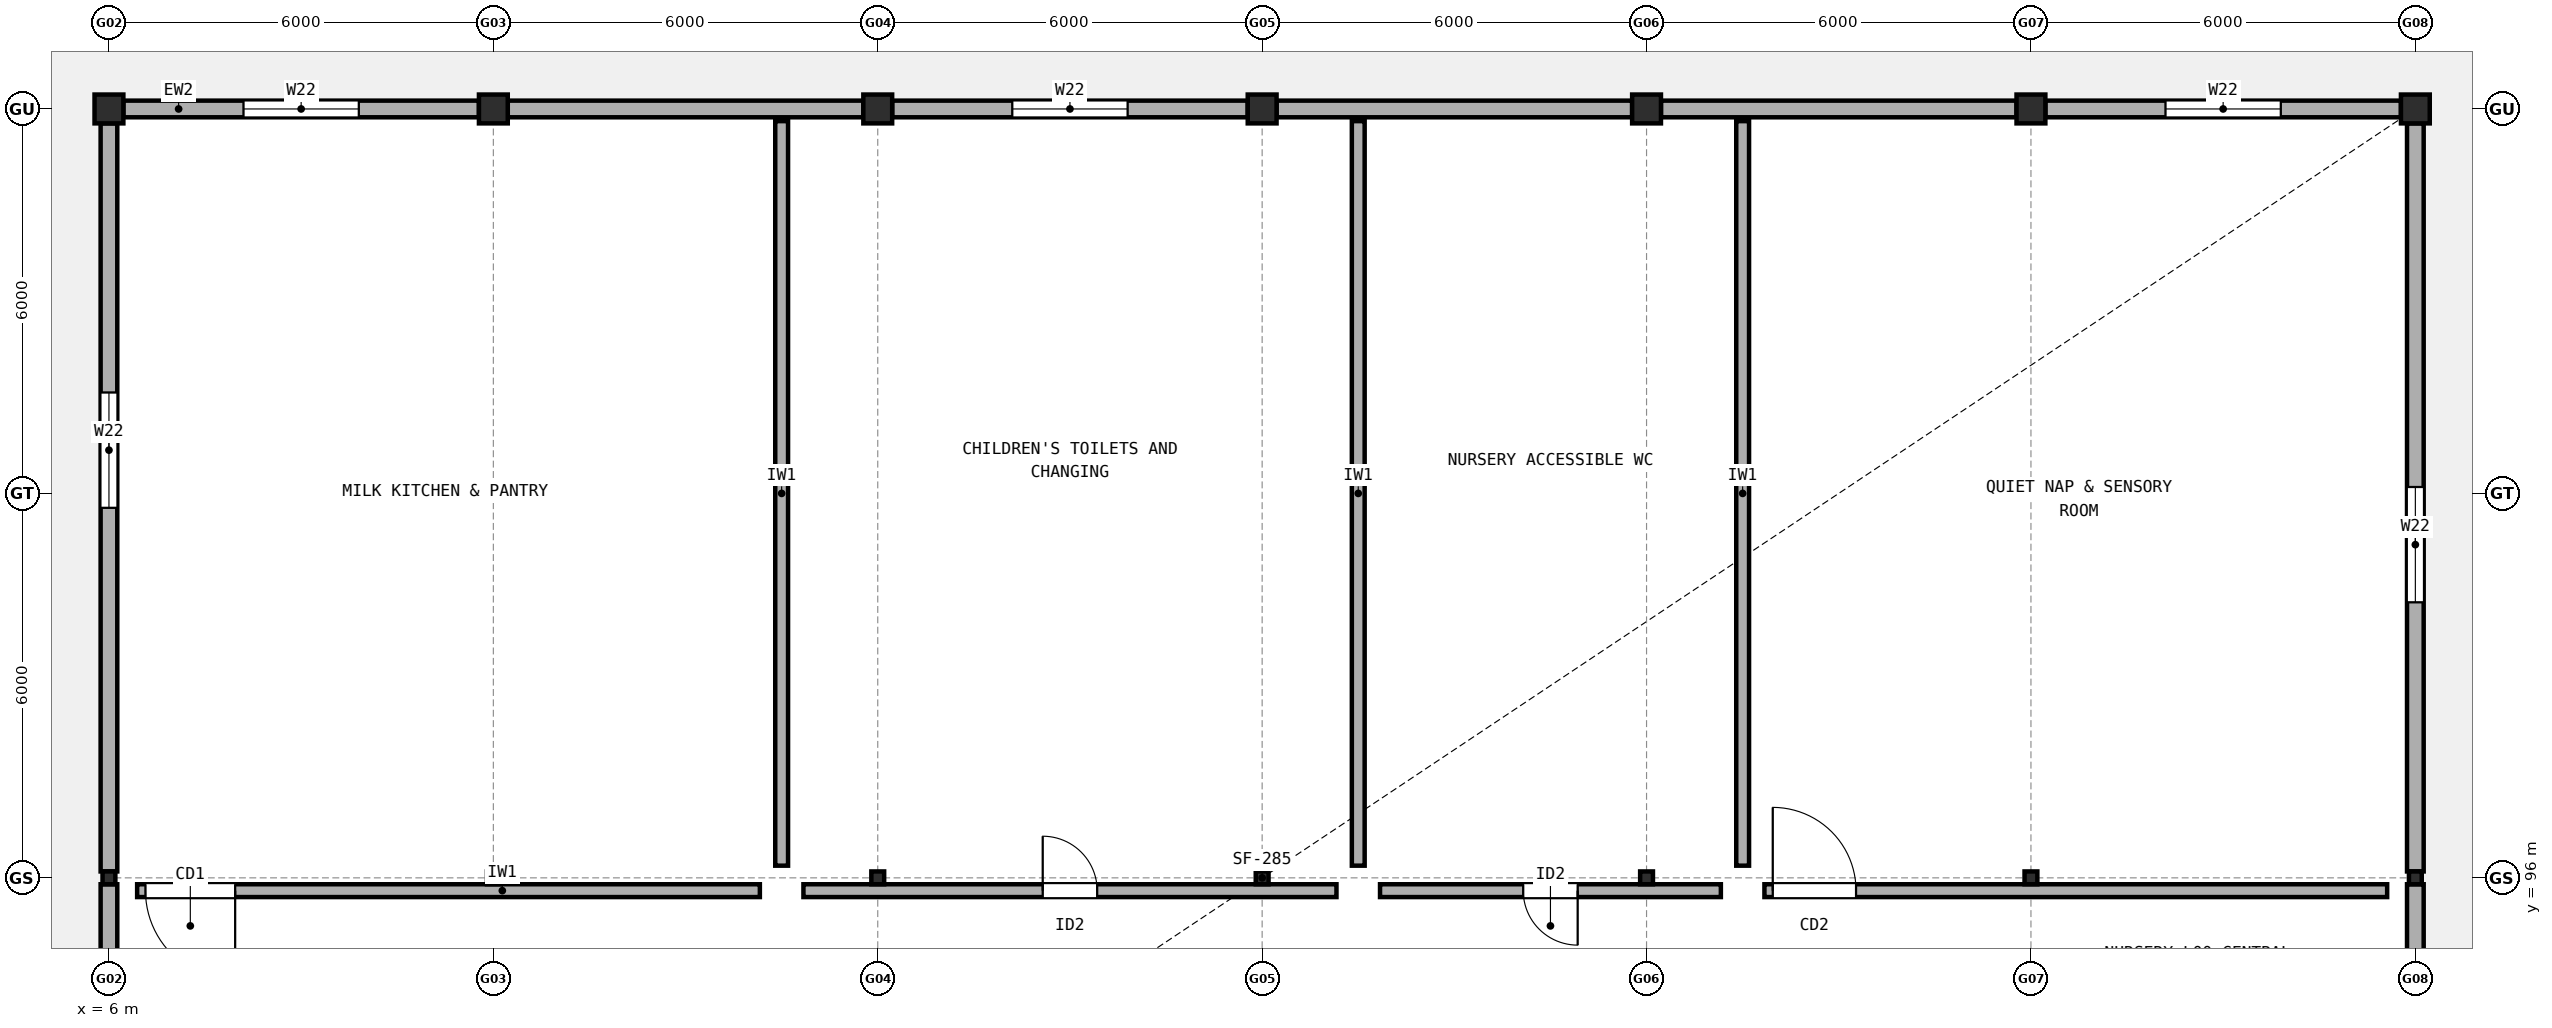
"""IFC4 building model, lengths in metres.
Left out: names, types, materials, properties, quantities, classifications, styles, units other than length and angle.
Written with IfcOpenShell. Run it as: python <this file> out.ifc"""

import sys

from ifc_helpers import new_model, si_unit, direction, frame, frame_2d, origin, origin_2d, place, context, subcontext, project, spatial, rectangle, i_section, extrude, element, fill, save


model = new_model("IFC4")
c1 = context("Model", 3, precision=1e-05, world=origin(), true_north=direction((0.0, 1.0)))
c2 = subcontext(c1, "Body", "Model", "MODEL_VIEW")
j1 = project(units=[si_unit("LENGTHUNIT", "METRE"), si_unit("PLANEANGLEUNIT", "RADIAN")], contexts=[c1])
p1 = place(None, origin())
s1 = spatial("IfcSite", under=j1, at=p1, CompositionType="ELEMENT")
p2 = place(p1, origin())
s2 = spatial("IfcBuilding", under=s1, at=p2, CompositionType="ELEMENT")
p3 = place(p2, origin())
s3 = spatial("IfcBuildingStorey", under=s2, at=p3, CompositionType="ELEMENT", Elevation=0.0)
p4 = place(p3, frame((6.0, 96.0, 0.0), z_axis=(0.0, 0.0, 1.0), x_axis=(1.0, 0.0, 0.0)))
e1 = element("IfcColumn", 1, at=p4, inside=s3, PredefinedType="COLUMN", context=c2, shape_type="SweptSolid", body=[
    extrude(i_section(OverallWidth=0.2, OverallDepth=0.2, WebThickness=0.009, FlangeThickness=0.015, FilletRadius=0.018, at=origin_2d()), origin(), (0.0, 0.0, 1.0), 4.23),
])
p5 = place(p3, frame((6.0, 108.0, 0.0), z_axis=(0.0, 0.0, 1.0), x_axis=(1.0, 0.0, 0.0)))
e2 = element("IfcColumn", 2, at=p5, inside=s3, PredefinedType="COLUMN", context=c2, shape_type="SweptSolid", body=[
    extrude(rectangle(XDim=0.45, YDim=0.45, at=origin_2d()), origin(), (0.0, 0.0, 1.0), 4.23),
])
p6 = place(p3, frame((12.0, 96.0, 0.0), z_axis=(0.0, 0.0, 1.0), x_axis=(1.0, 0.0, 0.0)))
e3 = element("IfcColumn", 3, at=p6, inside=s3, PredefinedType="COLUMN", context=c2, shape_type="SweptSolid", body=[
    extrude(i_section(OverallWidth=0.2, OverallDepth=0.2, WebThickness=0.009, FlangeThickness=0.015, FilletRadius=0.018, at=origin_2d()), origin(), (0.0, 0.0, 1.0), 4.23),
])
p7 = place(p3, frame((12.0, 108.0, 0.0), z_axis=(0.0, 0.0, 1.0), x_axis=(1.0, 0.0, 0.0)))
e4 = element("IfcColumn", 4, at=p7, inside=s3, PredefinedType="COLUMN", context=c2, shape_type="SweptSolid", body=[
    extrude(rectangle(XDim=0.45, YDim=0.45, at=origin_2d()), origin(), (0.0, 0.0, 1.0), 4.23),
])
p8 = place(p3, frame((18.0, 96.0, 0.0), z_axis=(0.0, 0.0, 1.0), x_axis=(1.0, 0.0, 0.0)))
e5 = element("IfcColumn", 5, at=p8, inside=s3, PredefinedType="COLUMN", context=c2, shape_type="SweptSolid", body=[
    extrude(i_section(OverallWidth=0.2, OverallDepth=0.2, WebThickness=0.009, FlangeThickness=0.015, FilletRadius=0.018, at=origin_2d()), origin(), (0.0, 0.0, 1.0), 4.23),
])
p9 = place(p3, frame((18.0, 108.0, 0.0), z_axis=(0.0, 0.0, 1.0), x_axis=(1.0, 0.0, 0.0)))
e6 = element("IfcColumn", 6, at=p9, inside=s3, PredefinedType="COLUMN", context=c2, shape_type="SweptSolid", body=[
    extrude(rectangle(XDim=0.45, YDim=0.45, at=origin_2d()), origin(), (0.0, 0.0, 1.0), 4.23),
])
p10 = place(p3, frame((24.0, 96.0, 0.0), z_axis=(0.0, 0.0, 1.0), x_axis=(1.0, 0.0, 0.0)))
e7 = element("IfcColumn", 7, at=p10, inside=s3, PredefinedType="COLUMN", context=c2, shape_type="SweptSolid", body=[
    extrude(i_section(OverallWidth=0.2, OverallDepth=0.2, WebThickness=0.009, FlangeThickness=0.015, FilletRadius=0.018, at=origin_2d()), origin(), (0.0, 0.0, 1.0), 4.23),
])
p11 = place(p3, frame((24.0, 108.0, 0.0), z_axis=(0.0, 0.0, 1.0), x_axis=(1.0, 0.0, 0.0)))
e8 = element("IfcColumn", 8, at=p11, inside=s3, PredefinedType="COLUMN", context=c2, shape_type="SweptSolid", body=[
    extrude(rectangle(XDim=0.45, YDim=0.45, at=origin_2d()), origin(), (0.0, 0.0, 1.0), 4.23),
])
p12 = place(p3, frame((30.0, 96.0, 0.0), z_axis=(0.0, 0.0, 1.0), x_axis=(1.0, 0.0, 0.0)))
e9 = element("IfcColumn", 9, at=p12, inside=s3, PredefinedType="COLUMN", context=c2, shape_type="SweptSolid", body=[
    extrude(i_section(OverallWidth=0.2, OverallDepth=0.2, WebThickness=0.009, FlangeThickness=0.015, FilletRadius=0.018, at=origin_2d()), origin(), (0.0, 0.0, 1.0), 4.23),
])
p13 = place(p3, frame((30.0, 108.0, 0.0), z_axis=(0.0, 0.0, 1.0), x_axis=(1.0, 0.0, 0.0)))
e10 = element("IfcColumn", 10, at=p13, inside=s3, PredefinedType="COLUMN", context=c2, shape_type="SweptSolid", body=[
    extrude(rectangle(XDim=0.45, YDim=0.45, at=origin_2d()), origin(), (0.0, 0.0, 1.0), 4.23),
])
p14 = place(p3, frame((36.0, 96.0, 0.0), z_axis=(0.0, 0.0, 1.0), x_axis=(1.0, 0.0, 0.0)))
e11 = element("IfcColumn", 11, at=p14, inside=s3, PredefinedType="COLUMN", context=c2, shape_type="SweptSolid", body=[
    extrude(i_section(OverallWidth=0.2, OverallDepth=0.2, WebThickness=0.009, FlangeThickness=0.015, FilletRadius=0.018, at=origin_2d()), origin(), (0.0, 0.0, 1.0), 4.23),
])
p15 = place(p3, frame((36.0, 108.0, 0.0), z_axis=(0.0, 0.0, 1.0), x_axis=(1.0, 0.0, 0.0)))
e12 = element("IfcColumn", 12, at=p15, inside=s3, PredefinedType="COLUMN", context=c2, shape_type="SweptSolid", body=[
    extrude(rectangle(XDim=0.45, YDim=0.45, at=origin_2d()), origin(), (0.0, 0.0, 1.0), 4.23),
])
p16 = place(p3, frame((42.0, 96.0, 0.0), z_axis=(0.0, 0.0, 1.0), x_axis=(1.0, 0.0, 0.0)))
e13 = element("IfcColumn", 13, at=p16, inside=s3, PredefinedType="COLUMN", context=c2, shape_type="SweptSolid", body=[
    extrude(i_section(OverallWidth=0.2, OverallDepth=0.2, WebThickness=0.009, FlangeThickness=0.015, FilletRadius=0.018, at=origin_2d()), origin(), (0.0, 0.0, 1.0), 4.23),
])
p17 = place(p3, frame((42.0, 108.0, 0.0), z_axis=(0.0, 0.0, 1.0), x_axis=(1.0, 0.0, 0.0)))
e14 = element("IfcColumn", 14, at=p17, inside=s3, PredefinedType="COLUMN", context=c2, shape_type="SweptSolid", body=[
    extrude(rectangle(XDim=0.45, YDim=0.45, at=origin_2d()), origin(), (0.0, 0.0, 1.0), 4.23),
])
p18 = place(p3, frame((11.775, 108.0, 0.0), z_axis=(0.0, 0.0, 1.0), x_axis=(-1.0, 0.0, 0.0)))
e15 = element("IfcWall", 15, at=p18, inside=s3, PredefinedType="STANDARD", context=c2, shape_type="SweptSolid", body=[
    extrude(rectangle(XDim=5.55, YDim=0.26, at=frame_2d((2.775, 0.0))), origin(), (0.0, 0.0, 1.0), 3.112),
])
p19 = place(p18, frame((1.875, 0.0, 0.85)))
e16 = element("IfcOpeningElement", 16, at=p19, cuts=e15, PredefinedType="OPENING", context=c2, shape_type="SweptSolid", body=[
    extrude(rectangle(XDim=1.8, YDim=1.45, at=frame_2d((0.9, 0.725))), frame((0.0, 0.14, 0.0), z_axis=(0.0, -1.0, 0.0), x_axis=(1.0, 0.0, 0.0)), (0.0, 0.0, 1.0), 0.28),
])
p20 = place(p3, frame((17.775, 108.0, 0.0), z_axis=(0.0, 0.0, 1.0), x_axis=(-1.0, 0.0, 0.0)))
e17 = element("IfcWall", 17, at=p20, inside=s3, PredefinedType="STANDARD", context=c2, shape_type="SweptSolid", body=[
    extrude(rectangle(XDim=5.55, YDim=0.26, at=frame_2d((2.775, 0.0))), origin(), (0.0, 0.0, 1.0), 3.112),
])
p21 = place(p3, frame((23.775, 108.0, 0.0), z_axis=(0.0, 0.0, 1.0), x_axis=(-1.0, 0.0, 0.0)))
e18 = element("IfcWall", 18, at=p21, inside=s3, PredefinedType="STANDARD", context=c2, shape_type="SweptSolid", body=[
    extrude(rectangle(XDim=5.55, YDim=0.26, at=frame_2d((2.775, 0.0))), origin(), (0.0, 0.0, 1.0), 3.112),
])
p22 = place(p21, frame((1.875, 0.0, 0.85)))
e19 = element("IfcOpeningElement", 19, at=p22, cuts=e18, PredefinedType="OPENING", context=c2, shape_type="SweptSolid", body=[
    extrude(rectangle(XDim=1.8, YDim=1.45, at=frame_2d((0.9, 0.725))), frame((0.0, 0.14, 0.0), z_axis=(0.0, -1.0, 0.0), x_axis=(1.0, 0.0, 0.0)), (0.0, 0.0, 1.0), 0.28),
])
for number, where, z_axis, x_axis in (
    (20, (29.775, 108.0, 0.0), (0.0, 0.0, 1.0), (-1.0, 0.0, 0.0)),
    (21, (35.775, 108.0, 0.0), (0.0, 0.0, 1.0), (-1.0, 0.0, 0.0)),
):
    element("IfcWall", number, at=place(p3, frame(where, z_axis=z_axis, x_axis=x_axis)), inside=s3, PredefinedType="STANDARD", context=c2, shape_type="SweptSolid", body=[
        extrude(rectangle(XDim=5.55, YDim=0.26, at=frame_2d((2.775, 0.0))), origin(), (0.0, 0.0, 1.0), 3.112),
    ])
p23 = place(p3, frame((41.775, 108.0, 0.0), z_axis=(0.0, 0.0, 1.0), x_axis=(-1.0, 0.0, 0.0)))
e22 = element("IfcWall", 22, at=p23, inside=s3, PredefinedType="STANDARD", context=c2, shape_type="SweptSolid", body=[
    extrude(rectangle(XDim=5.55, YDim=0.26, at=frame_2d((2.775, 0.0))), origin(), (0.0, 0.0, 1.0), 3.112),
])
p24 = place(p23, frame((1.875, 0.0, 0.85)))
e23 = element("IfcOpeningElement", 23, at=p24, cuts=e22, PredefinedType="OPENING", context=c2, shape_type="SweptSolid", body=[
    extrude(rectangle(XDim=1.8, YDim=1.45, at=frame_2d((0.9, 0.725))), frame((0.0, 0.14, 0.0), z_axis=(0.0, -1.0, 0.0), x_axis=(1.0, 0.0, 0.0)), (0.0, 0.0, 1.0), 0.28),
])
p25 = place(p3, frame((6.0, 95.9, 0.0), z_axis=(0.0, 0.0, 1.0), x_axis=(0.0, -1.0, 0.0)))
e24 = element("IfcWall", 24, at=p25, inside=s3, PredefinedType="STANDARD", context=c2, shape_type="SweptSolid", body=[
    extrude(rectangle(XDim=11.675, YDim=0.26, at=frame_2d((5.837, 0.0))), origin(), (0.0, 0.0, 1.0), 2.912),
])
p26 = place(p25, frame((4.2, 0.0, 0.85)))
e25 = element("IfcOpeningElement", 25, at=p26, cuts=e24, PredefinedType="OPENING", context=c2, shape_type="SweptSolid", body=[
    extrude(rectangle(XDim=1.8, YDim=1.45, at=frame_2d((0.9, 0.725))), frame((0.0, 0.14, 0.0), z_axis=(0.0, -1.0, 0.0), x_axis=(1.0, 0.0, 0.0)), (0.0, 0.0, 1.0), 0.28),
])
p27 = place(p3, frame((42.0, 84.225, 0.0), z_axis=(0.0, 0.0, 1.0), x_axis=(0.0, 1.0, 0.0)))
e26 = element("IfcWall", 26, at=p27, inside=s3, PredefinedType="STANDARD", context=c2, shape_type="SweptSolid", body=[
    extrude(rectangle(XDim=11.675, YDim=0.26, at=frame_2d((5.837, 0.0))), origin(), (0.0, 0.0, 1.0), 2.912),
])
p28 = place(p27, frame((4.2, 0.0, 0.85)))
e27 = element("IfcOpeningElement", 27, at=p28, cuts=e26, PredefinedType="OPENING", context=c2, shape_type="SweptSolid", body=[
    extrude(rectangle(XDim=1.8, YDim=1.45, at=frame_2d((0.9, 0.725))), frame((0.0, 0.14, 0.0), z_axis=(0.0, -1.0, 0.0), x_axis=(1.0, 0.0, 0.0)), (0.0, 0.0, 1.0), 0.28),
])
p29 = place(p3, frame((6.0, 107.775, 0.0), z_axis=(0.0, 0.0, 1.0), x_axis=(0.0, -1.0, 0.0)))
e28 = element("IfcWall", 28, at=p29, inside=s3, PredefinedType="STANDARD", context=c2, shape_type="SweptSolid", body=[
    extrude(rectangle(XDim=11.675, YDim=0.26, at=frame_2d((5.837, 0.0))), origin(), (0.0, 0.0, 1.0), 2.912),
])
p30 = place(p29, frame((4.2, 0.0, 0.85)))
e29 = element("IfcOpeningElement", 29, at=p30, cuts=e28, PredefinedType="OPENING", context=c2, shape_type="SweptSolid", body=[
    extrude(rectangle(XDim=1.8, YDim=1.45, at=frame_2d((0.9, 0.725))), frame((0.0, 0.14, 0.0), z_axis=(0.0, -1.0, 0.0), x_axis=(1.0, 0.0, 0.0)), (0.0, 0.0, 1.0), 0.28),
])
p31 = place(p3, frame((42.0, 96.1, 0.0), z_axis=(0.0, 0.0, 1.0), x_axis=(0.0, 1.0, 0.0)))
e30 = element("IfcWall", 30, at=p31, inside=s3, PredefinedType="STANDARD", context=c2, shape_type="SweptSolid", body=[
    extrude(rectangle(XDim=11.675, YDim=0.26, at=frame_2d((5.837, 0.0))), origin(), (0.0, 0.0, 1.0), 2.912),
])
p32 = place(p31, frame((4.2, 0.0, 0.85)))
e31 = element("IfcOpeningElement", 31, at=p32, cuts=e30, PredefinedType="OPENING", context=c2, shape_type="SweptSolid", body=[
    extrude(rectangle(XDim=1.8, YDim=1.45, at=frame_2d((0.9, 0.725))), frame((0.0, 0.14, 0.0), z_axis=(0.0, -1.0, 0.0), x_axis=(1.0, 0.0, 0.0)), (0.0, 0.0, 1.0), 0.28),
])
p33 = place(p3, frame((6.44, 95.8, 0.0), z_axis=(0.0, 0.0, 1.0), x_axis=(1.0, 0.0, 0.0)))
e32 = element("IfcWall", 32, at=p33, inside=s3, PredefinedType="SOLIDWALL", context=c2, shape_type="SweptSolid", body=[
    extrude(rectangle(XDim=9.72, YDim=0.2, at=frame_2d((4.86, 0.0))), origin(), (0.0, 0.0, 1.0), 3.562),
])
p34 = place(p33, frame((0.13, 0.0, 0.0)))
e33 = element("IfcOpeningElement", 33, at=p34, cuts=e32, PredefinedType="OPENING", context=c2, shape_type="SweptSolid", body=[
    extrude(rectangle(XDim=1.4, YDim=2.15, at=frame_2d((0.7, 1.075))), frame((0.0, 0.11, 0.0), z_axis=(0.0, -1.0, 0.0), x_axis=(1.0, 0.0, 0.0)), (0.0, 0.0, 1.0), 0.22),
])
p35 = place(p3, frame((16.5, 96.19, 0.0), z_axis=(0.0, 0.0, 1.0), x_axis=(0.0, 1.0, 0.0)))
e34 = element("IfcWall", 34, at=p35, inside=s3, PredefinedType="SOLIDWALL", context=c2, shape_type="SweptSolid", body=[
    extrude(rectangle(XDim=11.62, YDim=0.2, at=frame_2d((5.81, 0.0))), origin(), (0.0, 0.0, 1.0), 3.112),
])
p36 = place(p3, frame((16.84, 95.8, 0.0), z_axis=(0.0, 0.0, 1.0), x_axis=(1.0, 0.0, 0.0)))
e35 = element("IfcWall", 35, at=p36, inside=s3, PredefinedType="SOLIDWALL", context=c2, shape_type="SweptSolid", body=[
    extrude(rectangle(XDim=8.32, YDim=0.2, at=frame_2d((4.16, 0.0))), origin(), (0.0, 0.0, 1.0), 2.912),
])
p37 = place(p36, frame((3.735, 0.0, 0.0)))
e36 = element("IfcOpeningElement", 36, at=p37, cuts=e35, PredefinedType="OPENING", context=c2, shape_type="SweptSolid", body=[
    extrude(rectangle(XDim=0.85, YDim=2.1, at=frame_2d((0.425, 1.05))), frame((0.0, 0.11, 0.0), z_axis=(0.0, -1.0, 0.0), x_axis=(1.0, 0.0, 0.0)), (0.0, 0.0, 1.0), 0.22),
])
p38 = place(p3, frame((25.5, 96.19, 0.0), z_axis=(0.0, 0.0, 1.0), x_axis=(0.0, 1.0, 0.0)))
e37 = element("IfcWall", 37, at=p38, inside=s3, PredefinedType="SOLIDWALL", context=c2, shape_type="SweptSolid", body=[
    extrude(rectangle(XDim=11.62, YDim=0.2, at=frame_2d((5.81, 0.0))), origin(), (0.0, 0.0, 1.0), 3.112),
])
p39 = place(p3, frame((25.84, 95.8, 0.0), z_axis=(0.0, 0.0, 1.0), x_axis=(1.0, 0.0, 0.0)))
e38 = element("IfcWall", 38, at=p39, inside=s3, PredefinedType="SOLIDWALL", context=c2, shape_type="SweptSolid", body=[
    extrude(rectangle(XDim=5.32, YDim=0.2, at=frame_2d((2.66, 0.0))), origin(), (0.0, 0.0, 1.0), 2.912),
])
p40 = place(p39, frame((2.235, 0.0, 0.0)))
e39 = element("IfcOpeningElement", 39, at=p40, cuts=e38, PredefinedType="OPENING", context=c2, shape_type="SweptSolid", body=[
    extrude(rectangle(XDim=0.85, YDim=2.1, at=frame_2d((0.425, 1.05))), frame((0.0, 0.11, 0.0), z_axis=(0.0, -1.0, 0.0), x_axis=(1.0, 0.0, 0.0)), (0.0, 0.0, 1.0), 0.22),
])
p41 = place(p3, frame((31.5, 96.19, 0.0), z_axis=(0.0, 0.0, 1.0), x_axis=(0.0, 1.0, 0.0)))
e40 = element("IfcWall", 40, at=p41, inside=s3, PredefinedType="SOLIDWALL", context=c2, shape_type="SweptSolid", body=[
    extrude(rectangle(XDim=11.62, YDim=0.2, at=frame_2d((5.81, 0.0))), origin(), (0.0, 0.0, 1.0), 3.112),
])
p42 = place(p3, frame((31.84, 95.8, 0.0), z_axis=(0.0, 0.0, 1.0), x_axis=(1.0, 0.0, 0.0)))
e41 = element("IfcWall", 41, at=p42, inside=s3, PredefinedType="SOLIDWALL", context=c2, shape_type="SweptSolid", body=[
    extrude(rectangle(XDim=9.72, YDim=0.2, at=frame_2d((4.86, 0.0))), origin(), (0.0, 0.0, 1.0), 2.912),
])
p43 = place(p42, frame((0.13, 0.0, 0.0)))
e42 = element("IfcOpeningElement", 42, at=p43, cuts=e41, PredefinedType="OPENING", context=c2, shape_type="SweptSolid", body=[
    extrude(rectangle(XDim=1.3, YDim=2.15, at=frame_2d((0.65, 1.075))), frame((0.0, 0.11, 0.0), z_axis=(0.0, -1.0, 0.0), x_axis=(1.0, 0.0, 0.0)), (0.0, 0.0, 1.0), 0.22),
])
p44 = place(p19, origin())
e43 = element("IfcWindow", 43, at=p44, inside=s3, PartitioningType="SINGLE_PANEL", PredefinedType="WINDOW", context=c2, shape_type="SweptSolid", body=[
    extrude(rectangle(XDim=1.8, YDim=1.45, at=frame_2d((0.9, 0.725))), frame((0.0, 0.03, 0.0), z_axis=(0.0, -1.0, 0.0), x_axis=(1.0, 0.0, 0.0)), (0.0, 0.0, 1.0), 0.06),
])
fill(e16, e43)
p45 = place(p22, origin())
e44 = element("IfcWindow", 44, at=p45, inside=s3, PartitioningType="SINGLE_PANEL", PredefinedType="WINDOW", context=c2, shape_type="SweptSolid", body=[
    extrude(rectangle(XDim=1.8, YDim=1.45, at=frame_2d((0.9, 0.725))), frame((0.0, 0.03, 0.0), z_axis=(0.0, -1.0, 0.0), x_axis=(1.0, 0.0, 0.0)), (0.0, 0.0, 1.0), 0.06),
])
fill(e19, e44)
p46 = place(p24, origin())
e45 = element("IfcWindow", 45, at=p46, inside=s3, PartitioningType="SINGLE_PANEL", PredefinedType="WINDOW", context=c2, shape_type="SweptSolid", body=[
    extrude(rectangle(XDim=1.8, YDim=1.45, at=frame_2d((0.9, 0.725))), frame((0.0, 0.03, 0.0), z_axis=(0.0, -1.0, 0.0), x_axis=(1.0, 0.0, 0.0)), (0.0, 0.0, 1.0), 0.06),
])
fill(e23, e45)
p47 = place(p30, origin())
e46 = element("IfcWindow", 46, at=p47, inside=s3, PartitioningType="SINGLE_PANEL", PredefinedType="WINDOW", context=c2, shape_type="SweptSolid", body=[
    extrude(rectangle(XDim=1.8, YDim=1.45, at=frame_2d((0.9, 0.725))), frame((0.0, 0.03, 0.0), z_axis=(0.0, -1.0, 0.0), x_axis=(1.0, 0.0, 0.0)), (0.0, 0.0, 1.0), 0.06),
])
fill(e29, e46)
p48 = place(p32, origin())
e47 = element("IfcWindow", 47, at=p48, inside=s3, PartitioningType="SINGLE_PANEL", PredefinedType="WINDOW", context=c2, shape_type="SweptSolid", body=[
    extrude(rectangle(XDim=1.8, YDim=1.45, at=frame_2d((0.9, 0.725))), frame((0.0, 0.03, 0.0), z_axis=(0.0, -1.0, 0.0), x_axis=(1.0, 0.0, 0.0)), (0.0, 0.0, 1.0), 0.06),
])
fill(e31, e47)
p49 = place(p34, origin())
e48 = element("IfcDoor", 48, at=p49, inside=s3, OperationType="SINGLE_SWING_RIGHT", PredefinedType="DOOR", context=c2, shape_type="SweptSolid", body=[
    extrude(rectangle(XDim=1.4, YDim=2.15, at=frame_2d((0.7, 1.075))), frame((0.0, 0.025, 0.0), z_axis=(0.0, -1.0, 0.0), x_axis=(1.0, 0.0, 0.0)), (0.0, 0.0, 1.0), 0.05),
])
fill(e33, e48)
p50 = place(p37, origin())
e49 = element("IfcDoor", 49, at=p50, inside=s3, OperationType="SINGLE_SWING_LEFT", PredefinedType="DOOR", context=c2, shape_type="SweptSolid", body=[
    extrude(rectangle(XDim=0.85, YDim=2.1, at=frame_2d((0.425, 1.05))), frame((0.0, 0.025, 0.0), z_axis=(0.0, -1.0, 0.0), x_axis=(1.0, 0.0, 0.0)), (0.0, 0.0, 1.0), 0.05),
])
fill(e36, e49)
p51 = place(p40, origin())
e50 = element("IfcDoor", 50, at=p51, inside=s3, OperationType="SINGLE_SWING_RIGHT", PredefinedType="DOOR", context=c2, shape_type="SweptSolid", body=[
    extrude(rectangle(XDim=0.85, YDim=2.1, at=frame_2d((0.425, 1.05))), frame((0.0, 0.025, 0.0), z_axis=(0.0, -1.0, 0.0), x_axis=(1.0, 0.0, 0.0)), (0.0, 0.0, 1.0), 0.05),
])
fill(e39, e50)
p52 = place(p43, origin())
e51 = element("IfcDoor", 51, at=p52, inside=s3, OperationType="SINGLE_SWING_LEFT", PredefinedType="DOOR", context=c2, shape_type="SweptSolid", body=[
    extrude(rectangle(XDim=1.3, YDim=2.15, at=frame_2d((0.65, 1.075))), frame((0.0, 0.025, 0.0), z_axis=(0.0, -1.0, 0.0), x_axis=(1.0, 0.0, 0.0)), (0.0, 0.0, 1.0), 0.05),
])
fill(e42, e51)
save(model, sys.argv[1])
